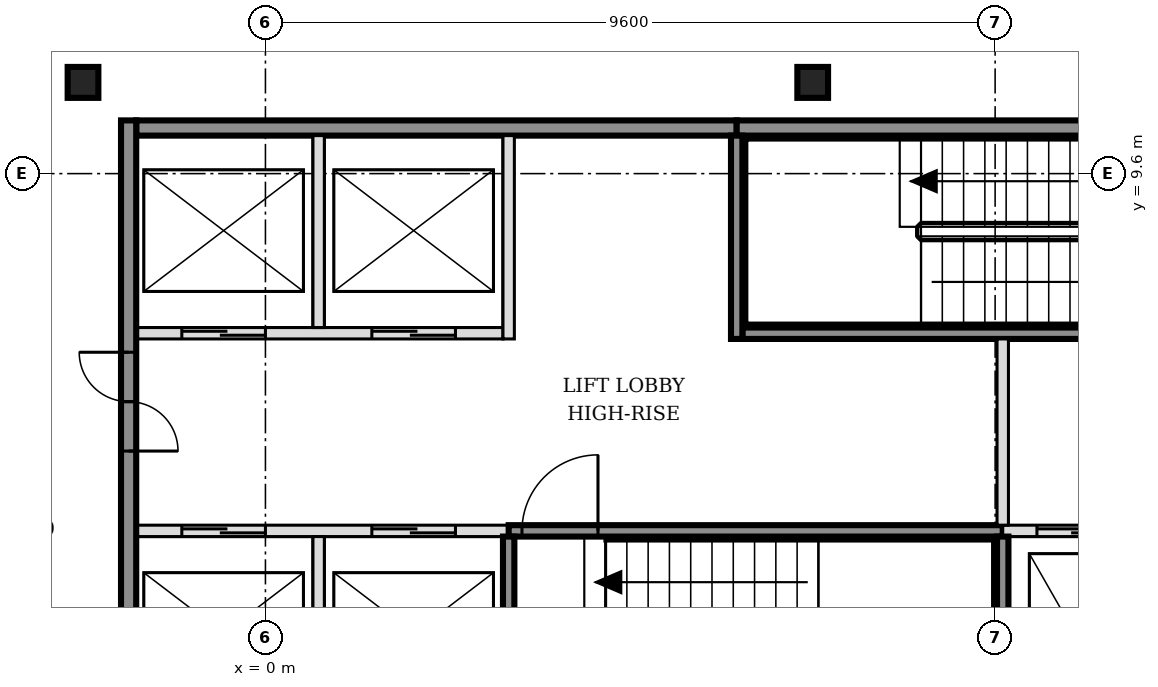
"""IFC4 building model, lengths in metres.
Left out: names, types, materials, properties, quantities, classifications, styles, units other than length and angle.
Written with IfcOpenShell. Run it as: python <this file> out.ifc"""

import sys

from ifc_helpers import new_model, si_unit, direction, frame, frame_2d, origin, origin_2d, place, context, subcontext, project, spatial, rectangle, i_section, extrude, element, fill, save


model = new_model("IFC4")
c1 = context("Model", 3, precision=1e-05, world=origin(), true_north=direction((0.0, 1.0)))
c2 = subcontext(c1, "Body", "Model", "MODEL_VIEW")
j1 = project(units=[si_unit("LENGTHUNIT", "METRE"), si_unit("PLANEANGLEUNIT", "RADIAN")], contexts=[c1])
p1 = place(None, origin())
s1 = spatial("IfcSite", under=j1, at=p1, CompositionType="ELEMENT")
p2 = place(p1, origin())
s2 = spatial("IfcBuilding", under=s1, at=p2, CompositionType="ELEMENT")
p3 = place(p2, frame((0.0, 0.0, 193.8)))
s3 = spatial("IfcBuildingStorey", under=s2, at=p3, CompositionType="ELEMENT", Elevation=193.8)
for number, where, z_axis, x_axis in (
    (1, (-2.4, 10.8, -0.15), (0.0, 0.0, 1.0), (1.0, 0.0, 0.0)),
    (2, (7.2, 10.8, -0.15), (0.0, 0.0, 1.0), (1.0, 0.0, 0.0)),
):
    element("IfcColumn", number, at=place(p3, frame(where, z_axis=z_axis, x_axis=x_axis)), inside=s3, PredefinedType="COLUMN", context=c2, shape_type="SweptSolid", body=[
        extrude(i_section(OverallWidth=0.404, OverallDepth=0.407, WebThickness=0.027, FlangeThickness=0.044, FilletRadius=0.015, at=origin_2d()), origin(), (0.0, 0.0, 1.0), 3.6),
    ])
p4 = place(p3, frame((-1.7, 4.9, 0.0), z_axis=(0.0, 0.0, 1.0), x_axis=(1.0, 0.0, 0.0)))
e3 = element("IfcWall", 3, at=p4, inside=s3, PredefinedType="SOLIDWALL", context=c2, shape_type="SweptSolid", body=[
    extrude(rectangle(XDim=4.9, YDim=0.15, at=frame_2d((2.45, 0.0))), origin(), (0.0, 0.0, 1.0), 3.45),
])
p5 = place(p4, frame((0.6, 0.0, 0.0)))
e4 = element("IfcOpeningElement", 4, at=p5, cuts=e3, PredefinedType="OPENING", context=c2, shape_type="SweptSolid", body=[
    extrude(rectangle(XDim=1.1, YDim=2.1, at=frame_2d((0.55, 1.05))), frame((0.0, 0.085, 0.0), z_axis=(0.0, -1.0, 0.0), x_axis=(1.0, 0.0, 0.0)), (0.0, 0.0, 1.0), 0.17),
])
p6 = place(p4, frame((3.1, 0.0, 0.0)))
e5 = element("IfcOpeningElement", 5, at=p6, cuts=e3, PredefinedType="OPENING", context=c2, shape_type="SweptSolid", body=[
    extrude(rectangle(XDim=1.1, YDim=2.1, at=frame_2d((0.55, 1.05))), frame((0.0, 0.085, 0.0), z_axis=(0.0, -1.0, 0.0), x_axis=(1.0, 0.0, 0.0)), (0.0, 0.0, 1.0), 0.17),
])
p7 = place(p3, frame((3.2, 4.9, 0.0), z_axis=(0.0, 0.0, 1.0), x_axis=(1.0, 0.0, 0.0)))
e6 = element("IfcWall", 6, at=p7, inside=s3, PredefinedType="SOLIDWALL", context=c2, shape_type="SweptSolid", body=[
    extrude(rectangle(XDim=6.5, YDim=0.15, at=frame_2d((3.25, 0.0))), origin(), (0.0, 0.0, 1.0), 3.45),
])
p8 = place(p7, frame((0.175, 0.0, 0.0)))
e7 = element("IfcOpeningElement", 7, at=p8, cuts=e6, PredefinedType="OPENING", context=c2, shape_type="SweptSolid", body=[
    extrude(rectangle(XDim=1.0, YDim=2.1, at=frame_2d((0.5, 1.05))), frame((0.0, 0.085, 0.0), z_axis=(0.0, -1.0, 0.0), x_axis=(1.0, 0.0, 0.0)), (0.0, 0.0, 1.0), 0.17),
])
p9 = place(p3, frame((9.7, 4.9, 0.0), z_axis=(0.0, 0.0, 1.0), x_axis=(1.0, 0.0, 0.0)))
e8 = element("IfcWall", 8, at=p9, inside=s3, PredefinedType="SOLIDWALL", context=c2, shape_type="SweptSolid", body=[
    extrude(rectangle(XDim=6.4, YDim=0.15, at=frame_2d((3.2, 0.0))), origin(), (0.0, 0.0, 1.0), 3.45),
])
p10 = place(p9, frame((0.45, 0.0, 0.0)))
e9 = element("IfcOpeningElement", 9, at=p10, cuts=e8, PredefinedType="OPENING", context=c2, shape_type="SweptSolid", body=[
    extrude(rectangle(XDim=1.0, YDim=2.1, at=frame_2d((0.5, 1.05))), frame((0.0, 0.085, 0.0), z_axis=(0.0, -1.0, 0.0), x_axis=(1.0, 0.0, 0.0)), (0.0, 0.0, 1.0), 0.17),
])
p11 = place(p9, frame((2.35, 0.0, 0.0)))
e10 = element("IfcOpeningElement", 10, at=p11, cuts=e8, PredefinedType="OPENING", context=c2, shape_type="SweptSolid", body=[
    extrude(rectangle(XDim=1.0, YDim=2.1, at=frame_2d((0.5, 1.05))), frame((0.0, 0.085, 0.0), z_axis=(0.0, -1.0, 0.0), x_axis=(1.0, 0.0, 0.0)), (0.0, 0.0, 1.0), 0.17),
])
p12 = place(p9, frame((4.7, 0.0, 0.0)))
e11 = element("IfcOpeningElement", 11, at=p12, cuts=e8, PredefinedType="OPENING", context=c2, shape_type="SweptSolid", body=[
    extrude(rectangle(XDim=0.9, YDim=2.1, at=frame_2d((0.45, 1.05))), frame((0.0, 0.085, 0.0), z_axis=(0.0, -1.0, 0.0), x_axis=(1.0, 0.0, 0.0)), (0.0, 0.0, 1.0), 0.17),
])
p13 = place(p3, frame((-1.7, 7.5, 0.0), z_axis=(0.0, 0.0, 1.0), x_axis=(1.0, 0.0, 0.0)))
e12 = element("IfcWall", 12, at=p13, inside=s3, PredefinedType="SOLIDWALL", context=c2, shape_type="SweptSolid", body=[
    extrude(rectangle(XDim=4.825, YDim=0.15, at=frame_2d((2.413, 0.0))), origin(), (0.0, 0.0, 1.0), 3.45),
])
p14 = place(p13, frame((0.6, 0.0, 0.0)))
e13 = element("IfcOpeningElement", 13, at=p14, cuts=e12, PredefinedType="OPENING", context=c2, shape_type="SweptSolid", body=[
    extrude(rectangle(XDim=1.1, YDim=2.1, at=frame_2d((0.55, 1.05))), frame((0.0, 0.085, 0.0), z_axis=(0.0, -1.0, 0.0), x_axis=(1.0, 0.0, 0.0)), (0.0, 0.0, 1.0), 0.17),
])
p15 = place(p13, frame((3.1, 0.0, 0.0)))
e14 = element("IfcOpeningElement", 14, at=p15, cuts=e12, PredefinedType="OPENING", context=c2, shape_type="SweptSolid", body=[
    extrude(rectangle(XDim=1.1, YDim=2.1, at=frame_2d((0.55, 1.05))), frame((0.0, 0.085, 0.0), z_axis=(0.0, -1.0, 0.0), x_axis=(1.0, 0.0, 0.0)), (0.0, 0.0, 1.0), 0.17),
])
p16 = place(p3, frame((6.275, 7.5, 0.0), z_axis=(0.0, 0.0, 1.0), x_axis=(1.0, 0.0, 0.0)))
e15 = element("IfcWall", 15, at=p16, inside=s3, PredefinedType="SOLIDWALL", context=c2, shape_type="SweptSolid", body=[
    extrude(rectangle(XDim=6.425, YDim=0.15, at=frame_2d((3.212, 0.0))), origin(), (0.0, 0.0, 1.0), 3.45),
])
p17 = place(p16, frame((5.225, 0.0, 0.0)))
e16 = element("IfcOpeningElement", 16, at=p17, cuts=e15, PredefinedType="OPENING", context=c2, shape_type="SweptSolid", body=[
    extrude(rectangle(XDim=1.0, YDim=2.1, at=frame_2d((0.5, 1.05))), frame((0.0, 0.085, 0.0), z_axis=(0.0, -1.0, 0.0), x_axis=(1.0, 0.0, 0.0)), (0.0, 0.0, 1.0), 0.17),
])
p18 = place(p3, frame((-1.7, 10.2, 0.0), z_axis=(0.0, 0.0, 1.0), x_axis=(1.0, 0.0, 0.0)))
e17 = element("IfcWall", 17, at=p18, inside=s3, PredefinedType="SOLIDWALL", context=c2, shape_type="SweptSolid", body=[
    extrude(rectangle(XDim=7.9, YDim=0.2, at=frame_2d((3.95, 0.0))), origin(), (0.0, 0.0, 1.0), 3.45),
])
p19 = place(p3, frame((6.2, 10.2, 0.0), z_axis=(0.0, 0.0, 1.0), x_axis=(1.0, 0.0, 0.0)))
e18 = element("IfcWall", 18, at=p19, inside=s3, PredefinedType="SOLIDWALL", context=c2, shape_type="SweptSolid", body=[
    extrude(rectangle(XDim=6.5, YDim=0.2, at=frame_2d((3.25, 0.0))), origin(), (0.0, 0.0, 1.0), 3.45),
])
p20 = place(p3, frame((-1.8, -5.5, 0.0), z_axis=(0.0, 0.0, 1.0), x_axis=(0.0, 1.0, 0.0)))
e19 = element("IfcWall", 19, at=p20, inside=s3, PredefinedType="SOLIDWALL", context=c2, shape_type="SweptSolid", body=[
    extrude(rectangle(XDim=15.8, YDim=0.2, at=frame_2d((7.9, 0.0))), origin(), (0.0, 0.0, 1.0), 3.45),
])
p21 = place(p20, frame((3.05, 0.0, 0.0)))
e20 = element("IfcOpeningElement", 20, at=p21, cuts=e19, PredefinedType="OPENING", context=c2, shape_type="SweptSolid", body=[
    extrude(rectangle(XDim=1.3, YDim=2.1, at=frame_2d((0.65, 1.05))), frame((0.0, 0.11, 0.0), z_axis=(0.0, -1.0, 0.0), x_axis=(1.0, 0.0, 0.0)), (0.0, 0.0, 1.0), 0.22),
])
p22 = place(p20, frame((11.45, 0.0, 0.0)))
e21 = element("IfcOpeningElement", 21, at=p22, cuts=e19, PredefinedType="OPENING", context=c2, shape_type="SweptSolid", body=[
    extrude(rectangle(XDim=1.3, YDim=2.1, at=frame_2d((0.65, 1.05))), frame((0.0, 0.11, 0.0), z_axis=(0.0, -1.0, 0.0), x_axis=(1.0, 0.0, 0.0)), (0.0, 0.0, 1.0), 0.22),
])
p23 = place(p3, frame((0.7, 2.275, 0.0), z_axis=(0.0, 0.0, 1.0), x_axis=(0.0, 1.0, 0.0)))
e22 = element("IfcWall", 22, at=p23, inside=s3, PredefinedType="SOLIDWALL", context=c2, shape_type="SweptSolid", body=[
    extrude(rectangle(XDim=2.55, YDim=0.15, at=frame_2d((1.275, 0.0))), origin(), (0.0, 0.0, 1.0), 3.45),
])
p24 = place(p3, frame((0.7, 7.575, 0.0), z_axis=(0.0, 0.0, 1.0), x_axis=(0.0, 1.0, 0.0)))
e23 = element("IfcWall", 23, at=p24, inside=s3, PredefinedType="SOLIDWALL", context=c2, shape_type="SweptSolid", body=[
    extrude(rectangle(XDim=2.525, YDim=0.15, at=frame_2d((1.263, 0.0))), origin(), (0.0, 0.0, 1.0), 3.45),
])
p25 = place(p3, frame((3.2, 2.275, 0.0), z_axis=(0.0, 0.0, 1.0), x_axis=(0.0, 1.0, 0.0)))
e24 = element("IfcWall", 24, at=p25, inside=s3, PredefinedType="SOLIDWALL", context=c2, shape_type="SweptSolid", body=[
    extrude(rectangle(XDim=2.55, YDim=0.15, at=frame_2d((1.275, 0.0))), origin(), (0.0, 0.0, 1.0), 3.45),
])
for number, where, z_axis, x_axis in (
    (25, (3.2, 7.425, 0.0), (0.0, 0.0, 1.0), (0.0, 1.0, 0.0)),
    (26, (6.2, 7.425, 0.0), (0.0, 0.0, 1.0), (0.0, 1.0, 0.0)),
):
    element("IfcWall", number, at=place(p3, frame(where, z_axis=z_axis, x_axis=x_axis)), inside=s3, PredefinedType="SOLIDWALL", context=c2, shape_type="SweptSolid", body=[
        extrude(rectangle(XDim=2.675, YDim=0.15, at=frame_2d((1.337, 0.0))), origin(), (0.0, 0.0, 1.0), 3.45),
    ])
p26 = place(p3, frame((9.7, 2.275, 0.0), z_axis=(0.0, 0.0, 1.0), x_axis=(0.0, 1.0, 0.0)))
e27 = element("IfcWall", 27, at=p26, inside=s3, PredefinedType="SOLIDWALL", context=c2, shape_type="SweptSolid", body=[
    extrude(rectangle(XDim=2.55, YDim=0.15, at=frame_2d((1.275, 0.0))), origin(), (0.0, 0.0, 1.0), 3.45),
])
p27 = place(p3, frame((9.7, 4.975, 0.0), z_axis=(0.0, 0.0, 1.0), x_axis=(0.0, 1.0, 0.0)))
e28 = element("IfcWall", 28, at=p27, inside=s3, PredefinedType="SOLIDWALL", context=c2, shape_type="SweptSolid", body=[
    extrude(rectangle(XDim=2.45, YDim=0.15, at=frame_2d((1.225, 0.0))), origin(), (0.0, 0.0, 1.0), 3.45),
])
p28 = place(p5, origin())
e29 = element("IfcDoor", 29, at=p28, inside=s3, OperationType="DOUBLE_DOOR_SLIDING", PredefinedType="DOOR", context=c2, shape_type="SweptSolid", body=[
    extrude(rectangle(XDim=1.1, YDim=2.1, at=frame_2d((0.55, 1.05))), frame((0.0, 0.025, 0.0), z_axis=(0.0, -1.0, 0.0), x_axis=(1.0, 0.0, 0.0)), (0.0, 0.0, 1.0), 0.05),
])
fill(e4, e29)
p29 = place(p6, origin())
e30 = element("IfcDoor", 30, at=p29, inside=s3, OperationType="DOUBLE_DOOR_SLIDING", PredefinedType="DOOR", context=c2, shape_type="SweptSolid", body=[
    extrude(rectangle(XDim=1.1, YDim=2.1, at=frame_2d((0.55, 1.05))), frame((0.0, 0.025, 0.0), z_axis=(0.0, -1.0, 0.0), x_axis=(1.0, 0.0, 0.0)), (0.0, 0.0, 1.0), 0.05),
])
fill(e5, e30)
p30 = place(p14, origin())
e31 = element("IfcDoor", 31, at=p30, inside=s3, OperationType="DOUBLE_DOOR_SLIDING", PredefinedType="DOOR", context=c2, shape_type="SweptSolid", body=[
    extrude(rectangle(XDim=1.1, YDim=2.1, at=frame_2d((0.55, 1.05))), frame((0.0, 0.025, 0.0), z_axis=(0.0, -1.0, 0.0), x_axis=(1.0, 0.0, 0.0)), (0.0, 0.0, 1.0), 0.05),
])
fill(e13, e31)
p31 = place(p15, origin())
e32 = element("IfcDoor", 32, at=p31, inside=s3, OperationType="DOUBLE_DOOR_SLIDING", PredefinedType="DOOR", context=c2, shape_type="SweptSolid", body=[
    extrude(rectangle(XDim=1.1, YDim=2.1, at=frame_2d((0.55, 1.05))), frame((0.0, 0.025, 0.0), z_axis=(0.0, -1.0, 0.0), x_axis=(1.0, 0.0, 0.0)), (0.0, 0.0, 1.0), 0.05),
])
fill(e14, e32)
p32 = place(p10, origin())
e33 = element("IfcDoor", 33, at=p32, inside=s3, OperationType="DOUBLE_DOOR_SLIDING", PredefinedType="DOOR", context=c2, shape_type="SweptSolid", body=[
    extrude(rectangle(XDim=1.0, YDim=2.1, at=frame_2d((0.5, 1.05))), frame((0.0, 0.025, 0.0), z_axis=(0.0, -1.0, 0.0), x_axis=(1.0, 0.0, 0.0)), (0.0, 0.0, 1.0), 0.05),
])
fill(e9, e33)
p33 = place(p8, origin())
e34 = element("IfcDoor", 34, at=p33, inside=s3, OperationType="SINGLE_SWING_RIGHT", PredefinedType="DOOR", context=c2, shape_type="SweptSolid", body=[
    extrude(rectangle(XDim=1.0, YDim=2.1, at=frame_2d((0.5, 1.05))), frame((0.0, 0.025, 0.0), z_axis=(0.0, -1.0, 0.0), x_axis=(1.0, 0.0, 0.0)), (0.0, 0.0, 1.0), 0.05),
])
fill(e7, e34)
p34 = place(p22, origin())
e35 = element("IfcDoor", 35, at=p34, inside=s3, OperationType="DOUBLE_DOOR_SINGLE_SWING", PredefinedType="DOOR", context=c2, shape_type="SweptSolid", body=[
    extrude(rectangle(XDim=1.3, YDim=2.1, at=frame_2d((0.65, 1.05))), frame((0.0, 0.025, 0.0), z_axis=(0.0, -1.0, 0.0), x_axis=(1.0, 0.0, 0.0)), (0.0, 0.0, 1.0), 0.05),
])
fill(e21, e35)
save(model, sys.argv[1])
